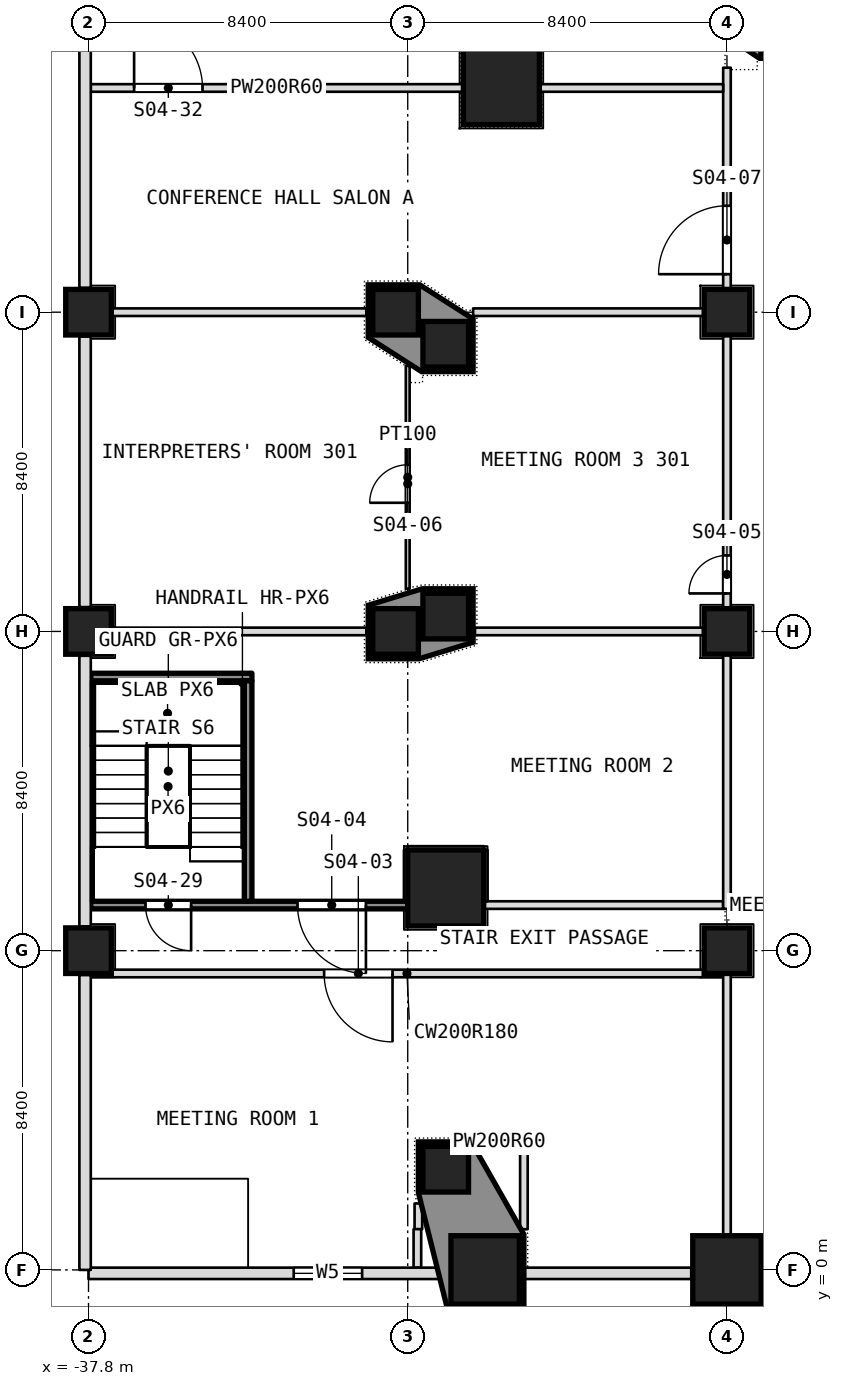
"""IFC4 building model, lengths in metres.
Left out: names, types, materials, properties, quantities, classifications, styles, units other than length and angle.
Written with IfcOpenShell. Run it as: python <this file> out.ifc"""

import sys

from ifc_helpers import new_model, si_unit, direction, frame, frame_2d, origin, origin_2d, place, context, subcontext, project, spatial, polyline, rectangle, outline, extrude, element, fill, save


model = new_model("IFC4")
c1 = context("Model", 3, precision=1e-05, world=origin(), true_north=direction((0.0, 1.0)))
c2 = subcontext(c1, "Body", "Model", "MODEL_VIEW")
j1 = project(units=[si_unit("LENGTHUNIT", "METRE"), si_unit("PLANEANGLEUNIT", "RADIAN")], contexts=[c1])
p1 = place(None, origin())
s1 = spatial("IfcSite", under=j1, at=p1, CompositionType="ELEMENT")
p2 = place(p1, origin())
s2 = spatial("IfcBuilding", under=s1, at=p2, CompositionType="ELEMENT")
p3 = place(p2, frame((0.0, 0.0, 21.0)))
s3 = spatial("IfcBuildingStorey", under=s2, at=p3, CompositionType="ELEMENT", Elevation=21.0)
p4 = place(p3, frame((-21.0, 0.0, 0.0), z_axis=(0.0, 0.0, 1.0), x_axis=(1.0, 0.0, 0.0)))
e1 = element("IfcColumn", 1, at=p4, inside=s3, PredefinedType="COLUMN", context=c2, shape_type="SweptSolid", body=[
    extrude(rectangle(XDim=1.8, YDim=1.8, at=origin_2d()), origin(), (0.0, 0.0, 1.0), 5.0),
])
for number, where, z_axis, x_axis in (
    (2, (-37.8, 8.4, 0.0), (0.0, 0.0, 1.0), (1.0, 0.0, 0.0)),
    (3, (-21.0, 8.4, 0.0), (0.0, 0.0, 1.0), (1.0, 0.0, 0.0)),
    (4, (-37.8, 16.8, 0.0), (0.0, 0.0, 1.0), (1.0, 0.0, 0.0)),
    (5, (-29.72, 16.8, 0.0), (0.0, 0.0, 1.0), (1.0, 0.0, 0.0)),
    (6, (-21.0, 16.8, 0.0), (0.0, 0.0, 1.0), (1.0, 0.0, 0.0)),
    (7, (-37.8, 25.2, 0.0), (0.0, 0.0, 1.0), (1.0, 0.0, 0.0)),
    (8, (-29.72, 25.2, 0.0), (0.0, 0.0, 1.0), (1.0, 0.0, 0.0)),
    (9, (-21.0, 25.2, 0.0), (0.0, 0.0, 1.0), (1.0, 0.0, 0.0)),
):
    element("IfcColumn", number, at=place(p3, frame(where, z_axis=z_axis, x_axis=x_axis)), inside=s3, PredefinedType="COLUMN", context=c2, shape_type="SweptSolid", body=[
        extrude(rectangle(XDim=1.2, YDim=1.2, at=origin_2d()), origin(), (0.0, 0.0, 1.0), 5.0),
    ])
p5 = place(p3, frame((-27.363, 0.0, 0.0), z_axis=(0.0, 0.0, 1.0), x_axis=(1.0, 0.0, 0.0)))
e10 = element("IfcColumn", 10, at=p5, inside=s3, PredefinedType="COLUMN", context=c2, shape_type="SweptSolid", body=[
    extrude(rectangle(XDim=1.8, YDim=1.8, at=origin_2d()), origin(), (0.0, 0.0, 1.0), 5.0),
])
for number, where, z_axis, x_axis in (
    (11, (-28.4, 10.05, 0.0), (0.0, 0.0, 1.0), (1.0, 0.0, 0.0)),
    (12, (-26.936, 31.135, 0.0), (0.0, 0.0, 1.0), (1.0, 0.0, 0.0)),
):
    element("IfcColumn", number, at=place(p3, frame(where, z_axis=z_axis, x_axis=x_axis)), inside=s3, PredefinedType="COLUMN", context=c2, shape_type="SweptSolid", body=[
        extrude(rectangle(XDim=2.0, YDim=2.0, at=origin_2d()), origin(), (0.0, 0.0, 1.0), 5.0),
    ])
p6 = place(p3, frame((-37.8, 2.4, 0.0), z_axis=(-1.0, 0.0, 0.0), x_axis=(0.0, -1.0, 0.0)))
e13 = element("IfcWall", 13, at=p6, inside=s3, PredefinedType="SOLIDWALL", context=c2, shape_type="SweptSolid", body=[
    extrude(outline(polyline([(0.0, 0.0), (1.495, 0.0), (2.4, 1.8), (3.6, 3.435), (4.8, 4.641), (5.279, 5.0), (0.0, 5.0), (0.0, 0.0)])), origin(), (0.0, 0.0, -1.0), 4.2),
])
for number, where, z_axis, x_axis in (
    (14, (-28.4, 2.649, 0.0), (0.0, 0.0, 1.0), (1.0, 0.0, 0.0)),
    (15, (-28.4, 17.203, 0.0), (0.0, 0.0, 1.0), (1.0, 0.0, 0.0)),
    (16, (-28.4, 24.356, 0.0), (0.0, 0.0, 1.0), (1.0, 0.0, 0.0)),
    (17, (-19.507, 32.6, 0.0), (0.0, 0.0, 1.0), (1.0, 0.0, 0.0)),
):
    element("IfcColumn", number, at=place(p3, frame(where, z_axis=z_axis, x_axis=x_axis)), inside=s3, PredefinedType="COLUMN", context=c2, shape_type="SweptSolid", body=[
        extrude(rectangle(XDim=1.2, YDim=1.2, at=origin_2d()), origin(), (0.0, 0.0, 1.0), 5.0),
    ])
p7 = place(p3, frame((-27.652, 3.369, 0.0), z_axis=(0.0, 0.0, 1.0), x_axis=(1.0, 0.0, 0.0)))
e18 = element("IfcWall", 18, at=p7, inside=s3, PredefinedType="PARTITIONING", context=c2, shape_type="SweptSolid", body=[
    extrude(rectangle(XDim=1.311, YDim=0.2, at=frame_2d((0.656, 0.0))), origin(), (0.0, 0.0, 1.0), 4.68),
])
p8 = place(p3, frame((-37.74, 7.8, 0.0), z_axis=(0.0, 0.0, 1.0), x_axis=(1.0, 0.0, 0.0)))
e19 = element("IfcWall", 19, at=p8, inside=s3, PredefinedType="PARTITIONING", context=c2, shape_type="SweptSolid", body=[
    extrude(rectangle(XDim=16.64, YDim=0.2, at=frame_2d((8.32, 0.0))), origin(), (0.0, 0.0, 1.0), 4.68),
])
p9 = place(p8, frame((6.14, 0.0, 0.0)))
e20 = element("IfcOpeningElement", 20, at=p9, cuts=e19, PredefinedType="OPENING", context=c2, shape_type="SweptSolid", body=[
    extrude(rectangle(XDim=1.8, YDim=2.1, at=frame_2d((0.9, 1.05))), frame((0.0, 0.1, 0.0), z_axis=(0.0, -1.0, 0.0), x_axis=(1.0, 0.0, 0.0)), (0.0, 0.0, 1.0), 0.2),
])
p10 = place(p3, frame((-37.74, 9.6, 0.0), z_axis=(0.0, 0.0, 1.0), x_axis=(1.0, 0.0, 0.0)))
e21 = element("IfcWall", 21, at=p10, inside=s3, PredefinedType="PARTITIONING", context=c2, shape_type="SweptSolid", body=[
    extrude(rectangle(XDim=8.44, YDim=0.2, at=frame_2d((4.22, 0.0))), origin(), (0.0, 0.0, 1.0), 4.68),
])
p11 = place(p10, frame((5.44, 0.0, 0.0)))
e22 = element("IfcOpeningElement", 22, at=p11, cuts=e21, PredefinedType="OPENING", context=c2, shape_type="SweptSolid", body=[
    extrude(rectangle(XDim=1.8, YDim=2.1, at=frame_2d((0.9, 1.05))), frame((0.0, 0.1, 0.0), z_axis=(0.0, -1.0, 0.0), x_axis=(1.0, 0.0, 0.0)), (0.0, 0.0, 1.0), 0.2),
])
p12 = place(p10, frame((1.44, 0.0, 0.0)))
e23 = element("IfcOpeningElement", 23, at=p12, cuts=e21, PredefinedType="OPENING", context=c2, shape_type="SweptSolid", body=[
    extrude(rectangle(XDim=1.2, YDim=2.1, at=frame_2d((0.6, 1.05))), frame((0.0, 0.1, 0.0), z_axis=(0.0, -1.0, 0.0), x_axis=(1.0, 0.0, 0.0)), (0.0, 0.0, 1.0), 0.2),
])
p13 = place(p3, frame((-27.5, 9.6, 0.0), z_axis=(0.0, 0.0, 1.0), x_axis=(1.0, 0.0, 0.0)))
e24 = element("IfcWall", 24, at=p13, inside=s3, PredefinedType="PARTITIONING", context=c2, shape_type="SweptSolid", body=[
    extrude(rectangle(XDim=6.4, YDim=0.2, at=frame_2d((3.2, 0.0))), origin(), (0.0, 0.0, 1.0), 4.68),
])
p14 = place(p3, frame((-29.402, 11.05, 0.0), z_axis=(0.0, 0.0, 1.0), x_axis=(1.0, 0.0, 0.0)))
e25 = element("IfcWall", 25, at=p14, inside=s3, PredefinedType="PARTITIONING", context=c2, shape_type="SweptSolid", body=[
    extrude(rectangle(XDim=2.004, YDim=0.2, at=frame_2d((1.002, 0.0))), origin(), (0.0, 0.0, 1.0), 4.68),
])
p15 = place(p3, frame((-37.74, 15.6, 0.0), z_axis=(0.0, 0.0, 1.0), x_axis=(1.0, 0.0, 0.0)))
e26 = element("IfcWall", 26, at=p15, inside=s3, PredefinedType="PARTITIONING", context=c2, shape_type="SweptSolid", body=[
    extrude(rectangle(XDim=4.24, YDim=0.2, at=frame_2d((2.12, 0.0))), origin(), (0.0, 0.0, 1.0), 4.68),
])
p16 = place(p3, frame((-38.1, 16.8, 0.0), z_axis=(0.0, 0.0, 1.0), x_axis=(1.0, 0.0, 0.0)))
e27 = element("IfcWall", 27, at=p16, inside=s3, PredefinedType="PARTITIONING", context=c2, shape_type="SweptSolid", body=[
    extrude(rectangle(XDim=7.61, YDim=0.2, at=frame_2d((3.805, 0.0))), origin(), (0.0, 0.0, 1.0), 4.68),
])
p17 = place(p3, frame((-27.63, 16.8, 0.0), z_axis=(0.0, 0.0, 1.0), x_axis=(1.0, 0.0, 0.0)))
e28 = element("IfcWall", 28, at=p17, inside=s3, PredefinedType="PARTITIONING", context=c2, shape_type="SweptSolid", body=[
    extrude(rectangle(XDim=6.53, YDim=0.2, at=frame_2d((3.265, 0.0))), origin(), (0.0, 0.0, 1.0), 4.68),
])
p18 = place(p3, frame((-21.0, -0.3, 0.0), z_axis=(0.0, 0.0, 1.0), x_axis=(0.0, 1.0, 0.0)))
e29 = element("IfcWall", 29, at=p18, inside=s3, PredefinedType="PARTITIONING", context=c2, shape_type="SweptSolid", body=[
    extrude(rectangle(XDim=8.2, YDim=0.2, at=frame_2d((4.1, 0.0))), origin(), (0.0, 0.0, 1.0), 4.68),
])
p19 = place(p3, frame((-21.0, 9.5, 0.0), z_axis=(0.0, 0.0, 1.0), x_axis=(0.0, 1.0, 0.0)))
e30 = element("IfcWall", 30, at=p19, inside=s3, PredefinedType="PARTITIONING", context=c2, shape_type="SweptSolid", body=[
    extrude(rectangle(XDim=22.133, YDim=0.2, at=frame_2d((11.066, 0.0))), origin(), (0.0, 0.0, 1.0), 4.68),
])
p20 = place(p19, frame((8.3, 0.0, 0.0)))
e31 = element("IfcOpeningElement", 31, at=p20, cuts=e30, PredefinedType="OPENING", context=c2, shape_type="SweptSolid", body=[
    extrude(rectangle(XDim=1.0, YDim=2.1, at=frame_2d((0.5, 1.05))), frame((0.0, 0.1, 0.0), z_axis=(0.0, -1.0, 0.0), x_axis=(1.0, 0.0, 0.0)), (0.0, 0.0, 1.0), 0.2),
])
p21 = place(p19, frame((16.7, 0.0, 0.0)))
e32 = element("IfcOpeningElement", 32, at=p21, cuts=e30, PredefinedType="OPENING", context=c2, shape_type="SweptSolid", body=[
    extrude(rectangle(XDim=1.8, YDim=2.1, at=frame_2d((0.9, 1.05))), frame((0.0, 0.1, 0.0), z_axis=(0.0, -1.0, 0.0), x_axis=(1.0, 0.0, 0.0)), (0.0, 0.0, 1.0), 0.2),
])
p22 = place(p3, frame((-38.1, 25.2, 0.0), z_axis=(0.0, 0.0, 1.0), x_axis=(1.0, 0.0, 0.0)))
e33 = element("IfcWall", 33, at=p22, inside=s3, PredefinedType="PARTITIONING", context=c2, shape_type="SweptSolid", body=[
    extrude(rectangle(XDim=7.61, YDim=0.2, at=frame_2d((3.805, 0.0))), origin(), (0.0, 0.0, 1.0), 4.68),
])
p23 = place(p3, frame((-27.68, 25.2, 0.0), z_axis=(0.0, 0.0, 1.0), x_axis=(1.0, 0.0, 0.0)))
e34 = element("IfcWall", 34, at=p23, inside=s3, PredefinedType="PARTITIONING", context=c2, shape_type="SweptSolid", body=[
    extrude(rectangle(XDim=6.58, YDim=0.2, at=frame_2d((3.29, 0.0))), origin(), (0.0, 0.0, 1.0), 4.68),
])
p24 = place(p3, frame((-26.343, 1.071, 0.0), z_axis=(0.0, 0.0, 1.0), x_axis=(0.0, 1.0, 0.0)))
e35 = element("IfcWall", 35, at=p24, inside=s3, PredefinedType="PARTITIONING", context=c2, shape_type="SweptSolid", body=[
    extrude(rectangle(XDim=2.3, YDim=0.2, at=frame_2d((1.15, 0.0))), origin(), (0.0, 0.0, 1.0), 4.68),
])
p25 = place(p3, frame((-27.4, 9.7, 0.0), z_axis=(0.0, 0.0, 1.0), x_axis=(0.0, 1.0, 0.0)))
e36 = element("IfcWall", 36, at=p25, inside=s3, PredefinedType="PARTITIONING", context=c2, shape_type="SweptSolid", body=[
    extrude(rectangle(XDim=1.352, YDim=0.2, at=frame_2d((0.676, 0.0))), origin(), (0.0, 0.0, 1.0), 4.68),
])
p26 = place(p3, frame((-29.12, 1.069, 0.0), z_axis=(0.0, 0.0, 1.0), x_axis=(0.0, 1.0, 0.0)))
e37 = element("IfcWall", 37, at=p26, inside=s3, PredefinedType="PARTITIONING", context=c2, shape_type="SweptSolid", body=[
    extrude(rectangle(XDim=0.679, YDim=0.2, at=frame_2d((0.339, 0.0))), origin(), (0.0, 0.0, 1.0), 4.68),
])
p27 = place(p3, frame((-29.146, 0.06, 0.0), z_axis=(0.0, 0.0, 1.0), x_axis=(0.0, 1.0, 0.0)))
e38 = element("IfcWall", 38, at=p27, inside=s3, PredefinedType="PARTITIONING", context=c2, shape_type="SweptSolid", body=[
    extrude(rectangle(XDim=1.013, YDim=0.2, at=frame_2d((0.506, 0.0))), origin(), (0.0, 0.0, 1.0), 4.68),
])
p28 = place(p3, frame((-29.4, 9.7, 0.0), z_axis=(0.0, 0.0, 1.0), x_axis=(0.0, 1.0, 0.0)))
e39 = element("IfcWall", 39, at=p28, inside=s3, PredefinedType="PARTITIONING", context=c2, shape_type="SweptSolid", body=[
    extrude(rectangle(XDim=1.352, YDim=0.2, at=frame_2d((0.676, 0.0))), origin(), (0.0, 0.0, 1.0), 4.68),
])
p29 = place(p3, frame((-29.4, 17.923, 0.0), z_axis=(0.0, 0.0, 1.0), x_axis=(0.0, 1.0, 0.0)))
e40 = element("IfcWall", 40, at=p29, inside=s3, PredefinedType="PARTITIONING", context=c2, shape_type="SweptSolid", body=[
    extrude(rectangle(XDim=5.866, YDim=0.1, at=frame_2d((2.933, 0.0))), origin(), (0.0, 0.0, 1.0), 4.68),
])
p30 = place(p29, frame((2.262, 0.0, 0.0)))
e41 = element("IfcOpeningElement", 41, at=p30, cuts=e40, PredefinedType="OPENING", context=c2, shape_type="SweptSolid", body=[
    extrude(rectangle(XDim=1.0, YDim=2.1, at=frame_2d((0.5, 1.05))), frame((0.0, 0.05, 0.0), z_axis=(0.0, -1.0, 0.0), x_axis=(1.0, 0.0, 0.0)), (0.0, 0.0, 1.0), 0.1),
])
p31 = place(p3, frame((-37.74, 31.1, 0.0), z_axis=(0.0, 0.0, 1.0), x_axis=(1.0, 0.0, 0.0)))
e42 = element("IfcWall", 42, at=p31, inside=s3, PredefinedType="PARTITIONING", context=c2, shape_type="SweptSolid", body=[
    extrude(rectangle(XDim=9.784, YDim=0.2, at=frame_2d((4.892, 0.0))), origin(), (0.0, 0.0, 1.0), 4.68),
])
p32 = place(p31, frame((1.14, 0.0, 0.0)))
e43 = element("IfcOpeningElement", 43, at=p32, cuts=e42, PredefinedType="OPENING", context=c2, shape_type="SweptSolid", body=[
    extrude(rectangle(XDim=1.8, YDim=2.1, at=frame_2d((0.9, 1.05))), frame((0.0, 0.1, 0.0), z_axis=(0.0, -1.0, 0.0), x_axis=(1.0, 0.0, 0.0)), (0.0, 0.0, 1.0), 0.2),
])
p33 = place(p3, frame((-25.916, 31.1, 0.0), z_axis=(0.0, 0.0, 1.0), x_axis=(1.0, 0.0, 0.0)))
e44 = element("IfcWall", 44, at=p33, inside=s3, PredefinedType="PARTITIONING", context=c2, shape_type="SweptSolid", body=[
    extrude(rectangle(XDim=4.816, YDim=0.2, at=frame_2d((2.408, 0.0))), origin(), (0.0, 0.0, 1.0), 4.68),
])
p34 = place(p3, frame((-33.6, 9.7, 0.0), z_axis=(0.0, 0.0, 1.0), x_axis=(0.0, 1.0, 0.0)))
e45 = element("IfcWall", 45, at=p34, inside=s3, PredefinedType="PARTITIONING", context=c2, shape_type="SweptSolid", body=[
    extrude(rectangle(XDim=5.8, YDim=0.2, at=frame_2d((2.9, 0.0))), origin(), (0.0, 0.0, 1.0), 4.68),
])
p35 = place(p3, frame((-37.8, -0.09, 0.0), z_axis=(0.0, 0.0, 1.0), x_axis=(1.0, 0.0, 0.0)))
e46 = element("IfcWall", 46, at=p35, inside=s3, PredefinedType="NOTDEFINED", context=c2, shape_type="SweptSolid", body=[
    extrude(rectangle(XDim=9.497, YDim=0.3, at=frame_2d((4.749, 0.0))), origin(), (0.0, 0.0, 1.0), 3.78),
])
p36 = place(p35, frame((5.4, 0.0, 1.2)))
e47 = element("IfcOpeningElement", 47, at=p36, cuts=e46, PredefinedType="OPENING", context=c2, shape_type="SweptSolid", body=[
    extrude(rectangle(XDim=1.8, YDim=2.4, at=frame_2d((0.9, 1.2))), frame((0.0, 0.15, 0.0), z_axis=(0.0, -1.0, 0.0), x_axis=(1.0, 0.0, 0.0)), (0.0, 0.0, 1.0), 0.3),
])
p37 = place(p3, frame((-26.423, -0.09, 0.0), z_axis=(0.0, 0.0, 1.0), x_axis=(1.0, 0.0, 0.0)))
e48 = element("IfcWall", 48, at=p37, inside=s3, PredefinedType="NOTDEFINED", context=c2, shape_type="SweptSolid", body=[
    extrude(rectangle(XDim=4.483, YDim=0.3, at=frame_2d((2.242, 0.0))), origin(), (0.0, 0.0, 1.0), 3.78),
])
p38 = place(p3, frame((-20.06, -0.09, 0.0), z_axis=(0.0, 0.0, 1.0), x_axis=(1.0, 0.0, 0.0)))
e49 = element("IfcWall", 49, at=p38, inside=s3, PredefinedType="NOTDEFINED", context=c2, shape_type="SweptSolid", body=[
    extrude(rectangle(XDim=3.26, YDim=0.3, at=frame_2d((1.63, 0.0))), origin(), (0.0, 0.0, 1.0), 5.0),
])
p39 = place(p3, frame((-37.89, 32.96, 0.0), z_axis=(0.0, 0.0, 1.0), x_axis=(0.0, -1.0, 0.0)))
e50 = element("IfcWall", 50, at=p39, inside=s3, PredefinedType="NOTDEFINED", context=c2, shape_type="SweptSolid", body=[
    extrude(rectangle(XDim=7.12, YDim=0.3, at=frame_2d((3.56, 0.0))), origin(), (0.0, 0.0, 1.0), 3.78),
])
p40 = place(p3, frame((-37.89, 24.56, 0.0), z_axis=(0.0, 0.0, 1.0), x_axis=(0.0, -1.0, 0.0)))
e51 = element("IfcWall", 51, at=p40, inside=s3, PredefinedType="NOTDEFINED", context=c2, shape_type="SweptSolid", body=[
    extrude(rectangle(XDim=7.12, YDim=0.3, at=frame_2d((3.56, 0.0))), origin(), (0.0, 0.0, 1.0), 3.78),
])
p41 = place(p3, frame((-37.89, 16.16, 0.0), z_axis=(0.0, 0.0, 1.0), x_axis=(0.0, -1.0, 0.0)))
e52 = element("IfcWall", 52, at=p41, inside=s3, PredefinedType="NOTDEFINED", context=c2, shape_type="SweptSolid", body=[
    extrude(rectangle(XDim=7.12, YDim=0.3, at=frame_2d((3.56, 0.0))), origin(), (0.0, 0.0, 1.0), 5.0),
])
p42 = place(p3, frame((-37.89, 7.76, 0.0), z_axis=(0.0, 0.0, 1.0), x_axis=(0.0, -1.0, 0.0)))
e53 = element("IfcWall", 53, at=p42, inside=s3, PredefinedType="NOTDEFINED", context=c2, shape_type="SweptSolid", body=[
    extrude(rectangle(XDim=7.76, YDim=0.3, at=frame_2d((3.88, 0.0))), origin(), (0.0, 0.0, 1.0), 3.78),
])
p43 = place(p3, origin())
e54 = element("IfcWall", 54, at=p43, inside=s3, PredefinedType="SOLIDWALL", context=c2, shape_type="SweptSolid", body=[
    extrude(outline(polyline([(-29.12, 2.034), (-29.12, 3.369), (-27.73, 3.369), (-26.343, 0.932), (-26.343, -1.02), (-28.357, -1.02), (-29.12, 2.034)]), holes=[polyline([(-28.263, -0.9), (-26.463, -0.9), (-26.463, 0.9), (-28.263, 0.9), (-28.263, -0.9)]), polyline([(-29.0, 2.049), (-27.8, 2.049), (-27.8, 3.249), (-29.0, 3.249), (-29.0, 2.049)])]), origin(), (0.0, 0.0, 1.0), 5.0),
])
p44 = place(p3, origin())
e55 = element("IfcWall", 55, at=p44, inside=s3, PredefinedType="SOLIDWALL", context=c2, shape_type="SweptSolid", body=[
    extrude(outline(polyline([(-30.44, 17.489), (-29.018, 17.923), (-27.68, 17.923), (-27.68, 16.514), (-29.102, 16.08), (-30.44, 16.08), (-30.44, 17.489)]), holes=[polyline([(-29.0, 16.603), (-27.8, 16.603), (-27.8, 17.803), (-29.0, 17.803), (-29.0, 16.603)]), polyline([(-30.32, 16.2), (-29.12, 16.2), (-29.12, 17.4), (-30.32, 17.4), (-30.32, 16.2)])]), origin(), (0.0, 0.0, 1.0), 5.0),
])
p45 = place(p3, origin())
e56 = element("IfcWall", 56, at=p45, inside=s3, PredefinedType="SOLIDWALL", context=c2, shape_type="SweptSolid", body=[
    extrude(outline(polyline([(-30.44, 24.534), (-30.44, 25.92), (-29.085, 25.92), (-27.68, 25.022), (-27.68, 23.636), (-29.035, 23.636), (-30.44, 24.534)]), holes=[polyline([(-29.0, 23.756), (-27.8, 23.756), (-27.8, 24.956), (-29.0, 24.956), (-29.0, 23.756)]), polyline([(-30.32, 24.6), (-29.12, 24.6), (-29.12, 25.8), (-30.32, 25.8), (-30.32, 24.6)])]), origin(), (0.0, 0.0, 1.0), 5.0),
])
p46 = place(p3, origin())
e57 = element("IfcWall", 57, at=p46, inside=s3, PredefinedType="SOLIDWALL", context=c2, shape_type="SweptSolid", body=[
    extrude(outline(polyline([(-21.72, 34.32), (-20.364, 34.32), (-18.787, 33.264), (-18.787, 31.88), (-20.143, 31.88), (-21.72, 32.936), (-21.72, 34.32)]), holes=[polyline([(-18.907, 32.0), (-18.907, 33.2), (-20.107, 33.2), (-20.107, 32.0), (-18.907, 32.0)]), polyline([(-20.4, 33.0), (-20.4, 34.2), (-21.6, 34.2), (-21.6, 33.0), (-20.4, 33.0)])]), origin(), (0.0, 0.0, 1.0), 5.0),
])
p47 = place(p9, origin())
e58 = element("IfcDoor", 58, at=p47, inside=s3, OperationType="DOUBLE_DOOR_SINGLE_SWING", PredefinedType="DOOR", context=c2, shape_type="SweptSolid", body=[
    extrude(rectangle(XDim=1.8, YDim=2.1, at=frame_2d((0.9, 1.05))), frame((0.0, 0.025, 0.0), z_axis=(0.0, -1.0, 0.0), x_axis=(1.0, 0.0, 0.0)), (0.0, 0.0, 1.0), 0.05),
])
fill(e20, e58)
p48 = place(p11, origin())
e59 = element("IfcDoor", 59, at=p48, inside=s3, OperationType="DOUBLE_DOOR_SINGLE_SWING", PredefinedType="DOOR", context=c2, shape_type="SweptSolid", body=[
    extrude(rectangle(XDim=1.8, YDim=2.1, at=frame_2d((0.9, 1.05))), frame((0.0, 0.025, 0.0), z_axis=(0.0, -1.0, 0.0), x_axis=(1.0, 0.0, 0.0)), (0.0, 0.0, 1.0), 0.05),
])
fill(e22, e59)
p49 = place(p20, origin())
e60 = element("IfcDoor", 60, at=p49, inside=s3, OperationType="SINGLE_SWING_RIGHT", PredefinedType="DOOR", context=c2, shape_type="SweptSolid", body=[
    extrude(rectangle(XDim=1.0, YDim=2.1, at=frame_2d((0.5, 1.05))), frame((0.0, 0.025, 0.0), z_axis=(0.0, -1.0, 0.0), x_axis=(1.0, 0.0, 0.0)), (0.0, 0.0, 1.0), 0.05),
])
fill(e31, e60)
p50 = place(p30, origin())
e61 = element("IfcDoor", 61, at=p50, inside=s3, OperationType="SINGLE_SWING_LEFT", PredefinedType="DOOR", context=c2, shape_type="SweptSolid", body=[
    extrude(rectangle(XDim=1.0, YDim=2.1, at=frame_2d((0.5, 1.05))), frame((0.0, 0.025, 0.0), z_axis=(0.0, -1.0, 0.0), x_axis=(1.0, 0.0, 0.0)), (0.0, 0.0, 1.0), 0.05),
])
fill(e41, e61)
p51 = place(p21, origin())
e62 = element("IfcDoor", 62, at=p51, inside=s3, OperationType="DOUBLE_DOOR_SINGLE_SWING", PredefinedType="DOOR", context=c2, shape_type="SweptSolid", body=[
    extrude(rectangle(XDim=1.8, YDim=2.1, at=frame_2d((0.9, 1.05))), frame((0.0, 0.025, 0.0), z_axis=(0.0, -1.0, 0.0), x_axis=(1.0, 0.0, 0.0)), (0.0, 0.0, 1.0), 0.05),
])
fill(e32, e62)
p52 = place(p12, origin())
e63 = element("IfcDoor", 63, at=p52, inside=s3, OperationType="SINGLE_SWING_RIGHT", PredefinedType="DOOR", context=c2, shape_type="SweptSolid", body=[
    extrude(rectangle(XDim=1.2, YDim=2.1, at=frame_2d((0.6, 1.05))), frame((0.0, 0.025, 0.0), z_axis=(0.0, -1.0, 0.0), x_axis=(1.0, 0.0, 0.0)), (0.0, 0.0, 1.0), 0.05),
])
fill(e23, e63)
p53 = place(p32, origin())
e64 = element("IfcDoor", 64, at=p53, inside=s3, OperationType="DOUBLE_DOOR_SINGLE_SWING", PredefinedType="DOOR", context=c2, shape_type="SweptSolid", body=[
    extrude(rectangle(XDim=1.8, YDim=2.1, at=frame_2d((0.9, 1.05))), frame((0.0, 0.025, 0.0), z_axis=(0.0, -1.0, 0.0), x_axis=(1.0, 0.0, 0.0)), (0.0, 0.0, 1.0), 0.05),
])
fill(e43, e64)
p54 = place(p36, origin())
e65 = element("IfcWindow", 65, at=p54, inside=s3, PartitioningType="SINGLE_PANEL", PredefinedType="WINDOW", context=c2, shape_type="SweptSolid", body=[
    extrude(rectangle(XDim=1.8, YDim=2.4, at=frame_2d((0.9, 1.2))), frame((0.0, 0.03, 0.0), z_axis=(0.0, -1.0, 0.0), x_axis=(1.0, 0.0, 0.0)), (0.0, 0.0, 1.0), 0.06),
])
fill(e47, e65)
save(model, sys.argv[1])
